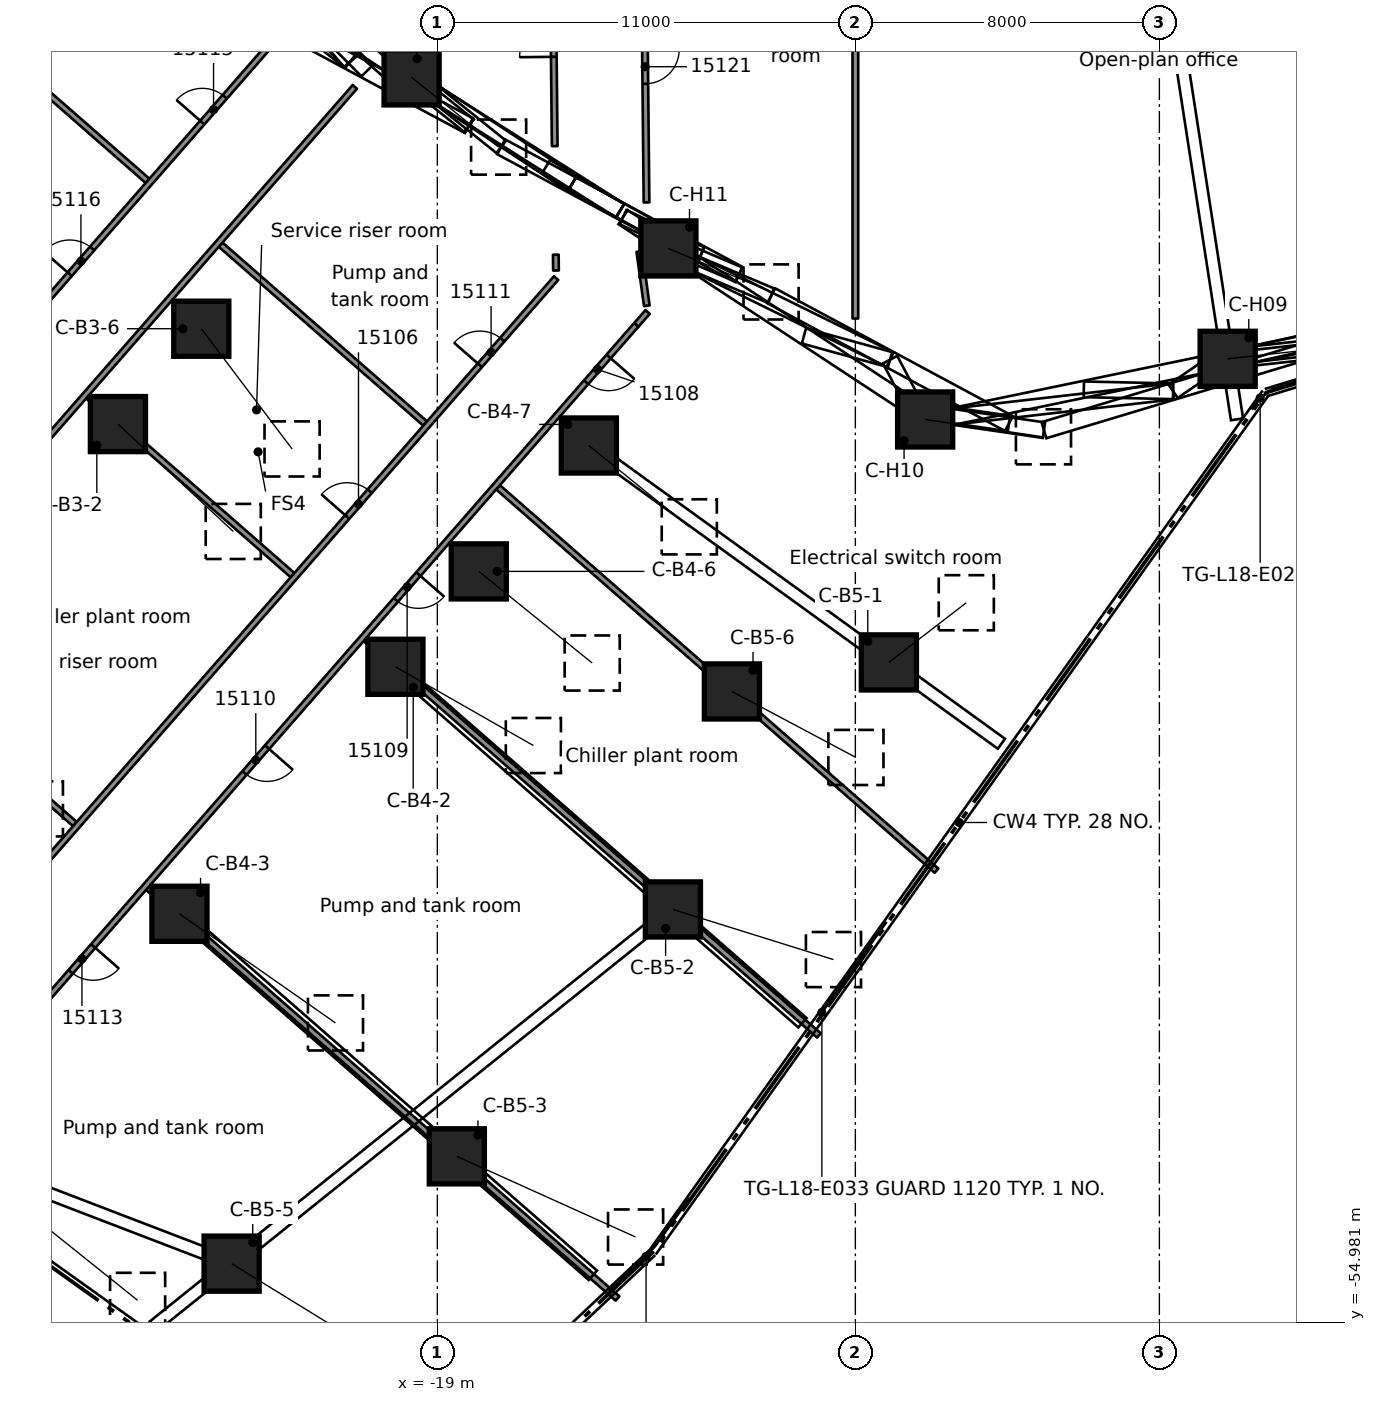
"""IFC4 building model, lengths in metres.
Left out: names, types, materials, properties, quantities, classifications, styles, units other than length and angle.
Written with IfcOpenShell. Run it as: python <this file> out.ifc"""

import sys

from ifc_helpers import new_model, si_unit, direction, frame, frame_2d, origin, origin_2d, place, context, subcontext, project, spatial, rectangle, extrude, element, fill, save


model = new_model("IFC4")
c1 = context("Model", 3, precision=1e-05, world=origin(), true_north=direction((0.0, 1.0)))
c2 = subcontext(c1, "Body", "Model", "MODEL_VIEW")
j1 = project(units=[si_unit("LENGTHUNIT", "METRE"), si_unit("PLANEANGLEUNIT", "RADIAN")], contexts=[c1])
p1 = place(None, origin())
s1 = spatial("IfcSite", under=j1, at=p1, CompositionType="ELEMENT")
p2 = place(p1, origin())
s2 = spatial("IfcBuilding", under=s1, at=p2, CompositionType="ELEMENT")
p3 = place(p2, frame((0.0, 0.0, 76.3)))
s3 = spatial("IfcBuildingStorey", under=s2, at=p3, CompositionType="ELEMENT", Elevation=76.3)
p4 = place(p3, frame((-27.405, -31.341, 0.57), z_axis=(0.575393887431, -0.535587054257, 0.61811680257), x_axis=(0.681333687003, 0.731972955071, 0.0)))
e1 = element("IfcColumn", 1, at=p4, inside=s3, PredefinedType="COLUMN", context=c2, shape_type="SweptSolid", body=[
    extrude(rectangle(XDim=1.45, YDim=1.45, at=origin_2d()), origin(), (0.0, 0.0, 1.0), 5.274),
])
p5 = place(p3, frame((-33.088, -37.841, 0.614), z_axis=(0.589009270479, -0.60813640554, 0.532201269773), x_axis=(0.718312748946, 0.695720342308, 0.0)))
e2 = element("IfcColumn", 2, at=p5, inside=s3, PredefinedType="COLUMN", context=c2, shape_type="SweptSolid", body=[
    extrude(rectangle(XDim=1.45, YDim=1.45, at=origin_2d()), origin(), (0.0, 0.0, 1.0), 5.961),
])
p6 = place(p3, frame((-25.211, -28.832, 0.558), z_axis=(0.464138906746, -0.614551218784, 0.637888606839), x_axis=(0.79798514852, 0.602677113173, 0.0)))
e3 = element("IfcColumn", 3, at=p6, inside=s3, PredefinedType="COLUMN", context=c2, shape_type="SweptSolid", body=[
    extrude(rectangle(XDim=1.45, YDim=1.45, at=origin_2d()), origin(), (0.0, 0.0, 1.0), 5.147),
])
p7 = place(p3, frame((-20.103, -37.727, 0.572), z_axis=(0.685113846317, -0.391052607014, 0.614570481013), x_axis=(0.495717436294, 0.868483864764, 0.0)))
e4 = element("IfcColumn", 4, at=p7, inside=s3, PredefinedType="COLUMN", context=c2, shape_type="SweptSolid", body=[
    extrude(rectangle(XDim=1.45, YDim=1.45, at=origin_2d()), origin(), (0.0, 0.0, 1.0), 5.299),
])
p8 = place(p3, frame((-25.786, -44.226, 0.612), z_axis=(0.692169494024, -0.484123543715, 0.535281034563), x_axis=(0.573148371456, 0.819451611931, 0.0)))
e5 = element("IfcColumn", 5, at=p8, inside=s3, PredefinedType="COLUMN", context=c2, shape_type="SweptSolid", body=[
    extrude(rectangle(XDim=1.45, YDim=1.45, at=origin_2d()), origin(), (0.0, 0.0, 1.0), 5.932),
])
p9 = place(p3, frame((-31.469, -50.725, 0.64), z_axis=(0.689070625417, -0.552343269862, 0.469146656627), x_axis=(0.625445126174, 0.78026815528, 0.0)))
e6 = element("IfcColumn", 6, at=p9, inside=s3, PredefinedType="COLUMN", context=c2, shape_type="SweptSolid", body=[
    extrude(rectangle(XDim=1.45, YDim=1.45, at=origin_2d()), origin(), (0.0, 0.0, 1.0), 6.65),
])
p10 = place(p3, frame((-17.909, -35.217, 0.55), z_axis=(0.589614339987, -0.476390247698, 0.652232521406), x_axis=(0.628467459522, 0.777835877497, 0.0)))
e7 = element("IfcColumn", 7, at=p10, inside=s3, PredefinedType="COLUMN", context=c2, shape_type="SweptSolid", body=[
    extrude(rectangle(XDim=1.45, YDim=1.45, at=origin_2d()), origin(), (0.0, 0.0, 1.0), 5.061),
])
p11 = place(p3, frame((-15.013, -31.905, 0.515), z_axis=(0.552011288363, -0.446963412702, 0.703922755156), x_axis=(0.629280838232, 0.777177989031, 0.0)))
e8 = element("IfcColumn", 8, at=p11, inside=s3, PredefinedType="COLUMN", context=c2, shape_type="SweptSolid", body=[
    extrude(rectangle(XDim=1.45, YDim=1.45, at=origin_2d()), origin(), (0.0, 0.0, 1.0), 4.788),
])
p12 = place(p3, frame((-7.118, -37.612, 0.425), z_axis=(0.464708627996, 0.358209419471, 0.80977274767), x_axis=(-0.610504138544, 0.792013066067, 0.0)))
e9 = element("IfcColumn", 9, at=p12, inside=s3, PredefinedType="COLUMN", context=c2, shape_type="SweptSolid", body=[
    extrude(rectangle(XDim=1.45, YDim=1.45, at=origin_2d()), origin(), (0.0, 0.0, 1.0), 4.383),
])
p13 = place(p3, frame((-12.801, -44.112, 0.586), z_axis=(0.771212262114, -0.240730881772, 0.589304920501), x_axis=(0.297967188269, 0.954576112584, 0.0)))
e10 = element("IfcColumn", 10, at=p13, inside=s3, PredefinedType="COLUMN", context=c2, shape_type="SweptSolid", body=[
    extrude(rectangle(XDim=1.45, YDim=1.45, at=origin_2d()), origin(), (0.0, 0.0, 1.0), 5.479),
])
p14 = place(p3, frame((-18.487, -50.608, 0.618), z_axis=(0.777095960952, -0.350717587525, 0.522607923086), x_axis=(0.411363636911, 0.911471315088, 0.0)))
e11 = element("IfcColumn", 11, at=p14, inside=s3, PredefinedType="COLUMN", context=c2, shape_type="SweptSolid", body=[
    extrude(rectangle(XDim=1.45, YDim=1.45, at=origin_2d()), origin(), (0.0, 0.0, 1.0), 6.053),
])
p15 = place(p3, frame((-24.413, -53.432, 0.634), z_axis=(0.744917193455, -0.458518104116, 0.484623073215), x_axis=(0.524186581487, 0.851603445148, 0.0)))
e12 = element("IfcColumn", 12, at=p15, inside=s3, PredefinedType="COLUMN", context=c2, shape_type="SweptSolid", body=[
    extrude(rectangle(XDim=1.45, YDim=1.45, at=origin_2d()), origin(), (0.0, 0.0, 1.0), 6.462),
])
p16 = place(p3, frame((-11.248, -38.376, 0.539), z_axis=(0.656603956326, -0.349550104696, 0.668345695613), x_axis=(0.469919638258, 0.882709201028, 0.0)))
e13 = element("IfcColumn", 13, at=p16, inside=s3, PredefinedType="COLUMN", context=c2, shape_type="SweptSolid", body=[
    extrude(rectangle(XDim=1.45, YDim=1.45, at=origin_2d()), origin(), (0.0, 0.0, 1.0), 4.969),
])
p17 = place(p3, frame((1.797, -29.624, 0.469), z_axis=(0.642678137038, 0.070948481985, 0.762844102735), x_axis=(-0.1097284362, 0.993961604032, 0.0)))
e14 = element("IfcColumn", 14, at=p17, inside=s3, PredefinedType="COLUMN", context=c2, shape_type="SweptSolid", body=[
    extrude(rectangle(XDim=1.45, YDim=1.45, at=origin_2d()), origin(), (0.0, 0.0, 1.0), 4.539),
])
p18 = place(p3, frame((-6.163, -31.22, 0.491), z_axis=(0.670106023434, -0.098169402539, 0.735744986909), x_axis=(0.144951118407, 0.989438817347, 0.0)))
e15 = element("IfcColumn", 15, at=p18, inside=s3, PredefinedType="COLUMN", context=c2, shape_type="SweptSolid", body=[
    extrude(rectangle(XDim=1.45, YDim=1.45, at=origin_2d()), origin(), (0.0, 0.0, 1.0), 4.646),
])
p19 = place(p3, frame((-12.92, -26.719, 0.469), z_axis=(0.595306617304, -0.252280476656, 0.762866038366), x_axis=(0.390190875101, 0.920733990351, 0.0)))
e16 = element("IfcColumn", 16, at=p19, inside=s3, PredefinedType="COLUMN", context=c2, shape_type="SweptSolid", body=[
    extrude(rectangle(XDim=1.45, YDim=1.45, at=origin_2d()), origin(), (0.0, 0.0, 1.0), 4.539),
])
p20 = place(p3, frame((-19.677, -22.219, 0.469), z_axis=(0.504604790097, -0.404114198636, 0.762932316967), x_axis=(0.625100883358, 0.780543967772, 0.0)))
e17 = element("IfcColumn", 17, at=p20, inside=s3, PredefinedType="COLUMN", context=c2, shape_type="SweptSolid", body=[
    extrude(rectangle(XDim=1.45, YDim=1.45, at=origin_2d()), origin(), (0.0, 0.0, 1.0), 4.538),
])
p21 = place(p3, frame((-15.911, -24.028, 0.0), z_axis=(0.0, 0.0, 1.0), x_axis=(-0.010337840811, 0.999946563096, 0.0)))
e18 = element("IfcWall", 18, at=p21, inside=s3, PredefinedType="PARTITIONING", context=c2, shape_type="SweptSolid", body=[
    extrude(rectangle(XDim=4.841, YDim=0.15, at=frame_2d((2.421, 0.0))), origin(), (0.0, 0.0, 1.0), 3.98),
])
p22 = place(p21, frame((2.35, 0.0, 0.0)))
e19 = element("IfcOpeningElement", 19, at=p22, cuts=e18, PredefinedType="OPENING", context=c2, shape_type="SweptSolid", body=[
    extrude(rectangle(XDim=0.9, YDim=2.1, at=frame_2d((0.45, 1.05))), frame((0.0, 0.085, 0.0), z_axis=(0.0, -1.0, 0.0), x_axis=(1.0, 0.0, 0.0)), (0.0, 0.0, 1.0), 0.17),
])
p23 = place(p3, frame((-15.882, -26.885, 0.0), z_axis=(0.0, 0.0, 1.0), x_axis=(0.009976029372, -0.999950238181, 0.0)))
e20 = element("IfcWall", 20, at=p23, inside=s3, PredefinedType="PARTITIONING", context=c2, shape_type="SweptSolid", body=[
    extrude(rectangle(XDim=0.416, YDim=0.15, at=frame_2d((0.208, 0.0))), origin(), (0.0, 0.0, 1.0), 3.98),
])
p24 = place(p3, frame((-13.567, -18.463, 0.0), z_axis=(0.0, 0.0, 1.0), x_axis=(0.010186228717, -0.999948119026, 0.0)))
e21 = element("IfcWall", 21, at=p24, inside=s3, PredefinedType="PARTITIONING", context=c2, shape_type="SweptSolid", body=[
    extrude(rectangle(XDim=7.046, YDim=0.15, at=frame_2d((3.523, 0.0))), origin(), (0.0, 0.0, 1.0), 3.98),
])
p25 = place(p24, frame((3.025, 0.0, 0.0)))
e22 = element("IfcOpeningElement", 22, at=p25, cuts=e21, PredefinedType="OPENING", context=c2, shape_type="SweptSolid", body=[
    extrude(rectangle(XDim=0.9, YDim=2.1, at=frame_2d((0.45, 1.05))), frame((0.0, 0.085, 0.0), z_axis=(0.0, -1.0, 0.0), x_axis=(1.0, 0.0, 0.0)), (0.0, 0.0, 1.0), 0.17),
])
p26 = place(p3, frame((-13.488, -28.227, 0.0), z_axis=(0.0, 0.0, 1.0), x_axis=(-0.136103974412, 0.990694558453, 0.0)))
e23 = element("IfcWall", 23, at=p26, inside=s3, PredefinedType="PARTITIONING", context=c2, shape_type="SweptSolid", body=[
    extrude(rectangle(XDim=1.44, YDim=0.15, at=frame_2d((0.72, 0.0))), origin(), (0.0, 0.0, 1.0), 3.98),
])
p27 = place(p3, frame((-33.919, -37.158, 0.0), z_axis=(0.0, 0.0, 1.0), x_axis=(0.752720514165, -0.658340206546, 0.0)))
e24 = element("IfcWall", 24, at=p27, inside=s3, PredefinedType="PARTITIONING", context=c2, shape_type="SweptSolid", body=[
    extrude(rectangle(XDim=7.15, YDim=0.15, at=frame_2d((3.575, 0.0))), origin(), (0.0, 0.0, 1.0), 3.98),
])
p28 = place(p3, frame((-26.617, -43.543, 0.0), z_axis=(0.0, 0.0, 1.0), x_axis=(0.752799620159, -0.658249748871, 0.0)))
e25 = element("IfcWall", 25, at=p28, inside=s3, PredefinedType="PARTITIONING", context=c2, shape_type="SweptSolid", body=[
    extrude(rectangle(XDim=16.415, YDim=0.15, at=frame_2d((8.207, 0.0))), origin(), (0.0, 0.0, 1.0), 3.98),
])
p29 = place(p3, frame((-28.193, -30.609, 0.0), z_axis=(0.0, 0.0, 1.0), x_axis=(0.752862172491, -0.658178204768, 0.0)))
e26 = element("IfcWall", 26, at=p29, inside=s3, PredefinedType="PARTITIONING", context=c2, shape_type="SweptSolid", body=[
    extrude(rectangle(XDim=7.15, YDim=0.15, at=frame_2d((3.575, 0.0))), origin(), (0.0, 0.0, 1.0), 3.98),
])
p30 = place(p3, frame((-20.89, -36.994, 0.0), z_axis=(0.0, 0.0, 1.0), x_axis=(0.752774169293, -0.658278854321, 0.0)))
e27 = element("IfcWall", 27, at=p30, inside=s3, PredefinedType="PARTITIONING", context=c2, shape_type="SweptSolid", body=[
    extrude(rectangle(XDim=15.851, YDim=0.15, at=frame_2d((7.925, 0.0))), origin(), (0.0, 0.0, 1.0), 3.98),
])
p31 = place(p3, frame((-39.14, -13.998, 0.0), z_axis=(0.0, 0.0, 1.0), x_axis=(0.752808649714, -0.658239422184, 0.0)))
e28 = element("IfcWall", 28, at=p31, inside=s3, PredefinedType="PARTITIONING", context=c2, shape_type="SweptSolid", body=[
    extrude(rectangle(XDim=16.623, YDim=0.15, at=frame_2d((8.312, 0.0))), origin(), (0.0, 0.0, 1.0), 3.98),
])
p32 = place(p3, frame((-24.704, -26.619, 0.0), z_axis=(0.0, 0.0, 1.0), x_axis=(0.752862172491, -0.658178204768, 0.0)))
e29 = element("IfcWall", 29, at=p32, inside=s3, PredefinedType="PARTITIONING", context=c2, shape_type="SweptSolid", body=[
    extrude(rectangle(XDim=7.15, YDim=0.15, at=frame_2d((3.575, 0.0))), origin(), (0.0, 0.0, 1.0), 3.98),
])
p33 = place(p3, frame((-17.402, -33.006, 0.0), z_axis=(0.0, 0.0, 1.0), x_axis=(0.752837171731, -0.658206800983, 0.0)))
e30 = element("IfcWall", 30, at=p33, inside=s3, PredefinedType="PARTITIONING", context=c2, shape_type="SweptSolid", body=[
    extrude(rectangle(XDim=15.325, YDim=0.15, at=frame_2d((7.663, 0.0))), origin(), (0.0, 0.0, 1.0), 3.98),
])
p34 = place(p3, frame((-13.767, -28.734, 0.0), z_axis=(0.0, 0.0, 1.0), x_axis=(0.660929934511, 0.750447614206, 0.0)))
e31 = element("IfcWall", 31, at=p34, inside=s3, PredefinedType="PARTITIONING", context=c2, shape_type="SweptSolid", body=[
    extrude(rectangle(XDim=0.456, YDim=0.15, at=frame_2d((0.228, 0.0))), origin(), (0.0, 0.0, 1.0), 3.98),
])
p35 = place(p3, frame((-13.766, -28.732, 0.0), z_axis=(0.0, 0.0, 1.0), x_axis=(-0.658218220516, -0.752827187461, 0.0)))
e32 = element("IfcWall", 32, at=p35, inside=s3, PredefinedType="PARTITIONING", context=c2, shape_type="SweptSolid", body=[
    extrude(rectangle(XDim=24.809, YDim=0.15, at=frame_2d((12.405, 0.0))), origin(), (0.0, 0.0, 1.0), 3.98),
])
p36 = place(p35, frame((1.103, 0.0, 0.0)))
e33 = element("IfcOpeningElement", 33, at=p36, cuts=e32, PredefinedType="OPENING", context=c2, shape_type="SweptSolid", body=[
    extrude(rectangle(XDim=0.9, YDim=2.1, at=frame_2d((0.45, 1.05))), frame((0.0, 0.085, 0.0), z_axis=(0.0, -1.0, 0.0), x_axis=(1.0, 0.0, 0.0)), (0.0, 0.0, 1.0), 0.17),
])
p37 = place(p35, frame((8.71, 0.0, 0.0)))
e34 = element("IfcOpeningElement", 34, at=p37, cuts=e32, PredefinedType="OPENING", context=c2, shape_type="SweptSolid", body=[
    extrude(rectangle(XDim=0.9, YDim=2.1, at=frame_2d((0.45, 1.05))), frame((0.0, 0.085, 0.0), z_axis=(0.0, -1.0, 0.0), x_axis=(1.0, 0.0, 0.0)), (0.0, 0.0, 1.0), 0.17),
])
p38 = place(p35, frame((14.759, 0.0, 0.0)))
e35 = element("IfcOpeningElement", 35, at=p38, cuts=e32, PredefinedType="OPENING", context=c2, shape_type="SweptSolid", body=[
    extrude(rectangle(XDim=0.9, YDim=2.1, at=frame_2d((0.45, 1.05))), frame((0.0, 0.085, 0.0), z_axis=(0.0, -1.0, 0.0), x_axis=(1.0, 0.0, 0.0)), (0.0, 0.0, 1.0), 0.17),
])
p39 = place(p35, frame((21.709, 0.0, 0.0)))
e36 = element("IfcOpeningElement", 36, at=p39, cuts=e32, PredefinedType="OPENING", context=c2, shape_type="SweptSolid", body=[
    extrude(rectangle(XDim=0.9, YDim=2.1, at=frame_2d((0.45, 1.05))), frame((0.0, 0.085, 0.0), z_axis=(0.0, -1.0, 0.0), x_axis=(1.0, 0.0, 0.0)), (0.0, 0.0, 1.0), 0.17),
])
p40 = place(p3, frame((-30.126, -43.795, 0.0), z_axis=(0.0, 0.0, 1.0), x_axis=(0.658319349285, 0.752738755716, 0.0)))
e37 = element("IfcWall", 37, at=p40, inside=s3, PredefinedType="PARTITIONING", context=c2, shape_type="SweptSolid", body=[
    extrude(rectangle(XDim=21.647, YDim=0.15, at=frame_2d((10.824, 0.0))), origin(), (0.0, 0.0, 1.0), 3.98),
])
p41 = place(p40, frame((13.3, 0.0, 0.0)))
e38 = element("IfcOpeningElement", 38, at=p41, cuts=e37, PredefinedType="OPENING", context=c2, shape_type="SweptSolid", body=[
    extrude(rectangle(XDim=0.9, YDim=2.1, at=frame_2d((0.45, 1.05))), frame((0.0, 0.085, 0.0), z_axis=(0.0, -1.0, 0.0), x_axis=(1.0, 0.0, 0.0)), (0.0, 0.0, 1.0), 0.17),
])
p42 = place(p40, frame((18.6, 0.0, 0.0)))
e39 = element("IfcOpeningElement", 39, at=p42, cuts=e37, PredefinedType="OPENING", context=c2, shape_type="SweptSolid", body=[
    extrude(rectangle(XDim=0.9, YDim=2.1, at=frame_2d((0.45, 1.05))), frame((0.0, 0.085, 0.0), z_axis=(0.0, -1.0, 0.0), x_axis=(1.0, 0.0, 0.0)), (0.0, 0.0, 1.0), 0.17),
])
p43 = place(p3, frame((-21.17, -22.468, 0.0), z_axis=(0.0, 0.0, 1.0), x_axis=(-0.658339236885, -0.752721362243, 0.0)))
e40 = element("IfcWall", 40, at=p43, inside=s3, PredefinedType="PARTITIONING", context=c2, shape_type="SweptSolid", body=[
    extrude(rectangle(XDim=21.951, YDim=0.15, at=frame_2d((10.976, 0.0))), origin(), (0.0, 0.0, 1.0), 3.98),
])
p44 = place(p43, frame((14.601, 0.0, 0.0)))
e41 = element("IfcOpeningElement", 41, at=p44, cuts=e40, PredefinedType="OPENING", context=c2, shape_type="SweptSolid", body=[
    extrude(rectangle(XDim=0.9, YDim=2.1, at=frame_2d((0.45, 1.05))), frame((0.0, 0.085, 0.0), z_axis=(0.0, -1.0, 0.0), x_axis=(1.0, 0.0, 0.0)), (0.0, 0.0, 1.0), 0.17),
])
p45 = place(p3, frame((-39.008, -39.217, 0.0), z_axis=(0.0, 0.0, 1.0), x_axis=(0.658208230207, 0.752835922156, 0.0)))
e42 = element("IfcWall", 42, at=p45, inside=s3, PredefinedType="PARTITIONING", context=c2, shape_type="SweptSolid", body=[
    extrude(rectangle(XDim=23.798, YDim=0.15, at=frame_2d((11.899, 0.0))), origin(), (0.0, 0.0, 1.0), 3.98),
])
p46 = place(p45, frame((21.001, 0.0, 0.0)))
e43 = element("IfcOpeningElement", 43, at=p46, cuts=e42, PredefinedType="OPENING", context=c2, shape_type="SweptSolid", body=[
    extrude(rectangle(XDim=0.9, YDim=2.1, at=frame_2d((0.45, 1.05))), frame((0.0, 0.085, 0.0), z_axis=(0.0, -1.0, 0.0), x_axis=(1.0, 0.0, 0.0)), (0.0, 0.0, 1.0), 0.17),
])
p47 = place(p45, frame((15.7, 0.0, 0.0)))
e44 = element("IfcOpeningElement", 44, at=p47, cuts=e42, PredefinedType="OPENING", context=c2, shape_type="SweptSolid", body=[
    extrude(rectangle(XDim=0.9, YDim=2.1, at=frame_2d((0.45, 1.05))), frame((0.0, 0.085, 0.0), z_axis=(0.0, -1.0, 0.0), x_axis=(1.0, 0.0, 0.0)), (0.0, 0.0, 1.0), 0.17),
])
p48 = place(p45, frame((8.749, 0.0, 0.0)))
e45 = element("IfcOpeningElement", 45, at=p48, cuts=e42, PredefinedType="OPENING", context=c2, shape_type="SweptSolid", body=[
    extrude(rectangle(XDim=0.9, YDim=2.1, at=frame_2d((0.45, 1.05))), frame((0.0, 0.085, 0.0), z_axis=(0.0, -1.0, 0.0), x_axis=(1.0, 0.0, 0.0)), (0.0, 0.0, 1.0), 0.17),
])
p49 = place(p3, frame((-8.0, -28.563, 0.0), z_axis=(0.0, 0.0, 1.0), x_axis=(0.0, 1.0, 0.0)))
e46 = element("IfcWall", 46, at=p49, inside=s3, PredefinedType="PARTITIONING", context=c2, shape_type="SweptSolid", body=[
    extrude(rectangle(XDim=12.888, YDim=0.15, at=frame_2d((6.444, 0.0))), origin(), (0.0, 0.0, 1.0), 3.98),
])
p50 = place(p41, origin())
e47 = element("IfcDoor", 47, at=p50, inside=s3, OperationType="SINGLE_SWING_RIGHT", PredefinedType="DOOR", context=c2, shape_type="SweptSolid", body=[
    extrude(rectangle(XDim=0.9, YDim=2.1, at=frame_2d((0.45, 1.05))), frame((0.0, 0.025, 0.0), z_axis=(0.0, -1.0, 0.0), x_axis=(1.0, 0.0, 0.0)), (0.0, 0.0, 1.0), 0.05),
])
fill(e38, e47)
p51 = place(p36, origin())
e48 = element("IfcDoor", 48, at=p51, inside=s3, OperationType="SINGLE_SWING_LEFT", PredefinedType="DOOR", context=c2, shape_type="SweptSolid", body=[
    extrude(rectangle(XDim=0.9, YDim=2.1, at=frame_2d((0.45, 1.05))), frame((0.0, 0.025, 0.0), z_axis=(0.0, -1.0, 0.0), x_axis=(1.0, 0.0, 0.0)), (0.0, 0.0, 1.0), 0.05),
])
fill(e33, e48)
p52 = place(p37, origin())
e49 = element("IfcDoor", 49, at=p52, inside=s3, OperationType="SINGLE_SWING_LEFT", PredefinedType="DOOR", context=c2, shape_type="SweptSolid", body=[
    extrude(rectangle(XDim=0.9, YDim=2.1, at=frame_2d((0.45, 1.05))), frame((0.0, 0.025, 0.0), z_axis=(0.0, -1.0, 0.0), x_axis=(1.0, 0.0, 0.0)), (0.0, 0.0, 1.0), 0.05),
])
fill(e34, e49)
p53 = place(p38, origin())
e50 = element("IfcDoor", 50, at=p53, inside=s3, OperationType="SINGLE_SWING_RIGHT", PredefinedType="DOOR", context=c2, shape_type="SweptSolid", body=[
    extrude(rectangle(XDim=0.9, YDim=2.1, at=frame_2d((0.45, 1.05))), frame((0.0, 0.025, 0.0), z_axis=(0.0, -1.0, 0.0), x_axis=(1.0, 0.0, 0.0)), (0.0, 0.0, 1.0), 0.05),
])
fill(e35, e50)
p54 = place(p42, origin())
e51 = element("IfcDoor", 51, at=p54, inside=s3, OperationType="SINGLE_SWING_RIGHT", PredefinedType="DOOR", context=c2, shape_type="SweptSolid", body=[
    extrude(rectangle(XDim=0.9, YDim=2.1, at=frame_2d((0.45, 1.05))), frame((0.0, 0.025, 0.0), z_axis=(0.0, -1.0, 0.0), x_axis=(1.0, 0.0, 0.0)), (0.0, 0.0, 1.0), 0.05),
])
fill(e39, e51)
p55 = place(p39, origin())
e52 = element("IfcDoor", 52, at=p55, inside=s3, OperationType="SINGLE_SWING_RIGHT", PredefinedType="DOOR", context=c2, shape_type="SweptSolid", body=[
    extrude(rectangle(XDim=0.9, YDim=2.1, at=frame_2d((0.45, 1.05))), frame((0.0, 0.025, 0.0), z_axis=(0.0, -1.0, 0.0), x_axis=(1.0, 0.0, 0.0)), (0.0, 0.0, 1.0), 0.05),
])
fill(e36, e52)
p56 = place(p46, origin())
e53 = element("IfcDoor", 53, at=p56, inside=s3, OperationType="SINGLE_SWING_RIGHT", PredefinedType="DOOR", context=c2, shape_type="SweptSolid", body=[
    extrude(rectangle(XDim=0.9, YDim=2.1, at=frame_2d((0.45, 1.05))), frame((0.0, 0.025, 0.0), z_axis=(0.0, -1.0, 0.0), x_axis=(1.0, 0.0, 0.0)), (0.0, 0.0, 1.0), 0.05),
])
fill(e43, e53)
p57 = place(p47, origin())
e54 = element("IfcDoor", 54, at=p57, inside=s3, OperationType="SINGLE_SWING_RIGHT", PredefinedType="DOOR", context=c2, shape_type="SweptSolid", body=[
    extrude(rectangle(XDim=0.9, YDim=2.1, at=frame_2d((0.45, 1.05))), frame((0.0, 0.025, 0.0), z_axis=(0.0, -1.0, 0.0), x_axis=(1.0, 0.0, 0.0)), (0.0, 0.0, 1.0), 0.05),
])
fill(e44, e54)
p58 = place(p22, origin())
e55 = element("IfcDoor", 55, at=p58, inside=s3, OperationType="SINGLE_SWING_RIGHT", PredefinedType="DOOR", context=c2, shape_type="SweptSolid", body=[
    extrude(rectangle(XDim=0.9, YDim=2.1, at=frame_2d((0.45, 1.05))), frame((0.0, 0.025, 0.0), z_axis=(0.0, -1.0, 0.0), x_axis=(1.0, 0.0, 0.0)), (0.0, 0.0, 1.0), 0.05),
])
fill(e19, e55)
p59 = place(p25, origin())
e56 = element("IfcDoor", 56, at=p59, inside=s3, OperationType="SINGLE_SWING_LEFT", PredefinedType="DOOR", context=c2, shape_type="SweptSolid", body=[
    extrude(rectangle(XDim=0.9, YDim=2.1, at=frame_2d((0.45, 1.05))), frame((0.0, 0.025, 0.0), z_axis=(0.0, -1.0, 0.0), x_axis=(1.0, 0.0, 0.0)), (0.0, 0.0, 1.0), 0.05),
])
fill(e22, e56)
save(model, sys.argv[1])
